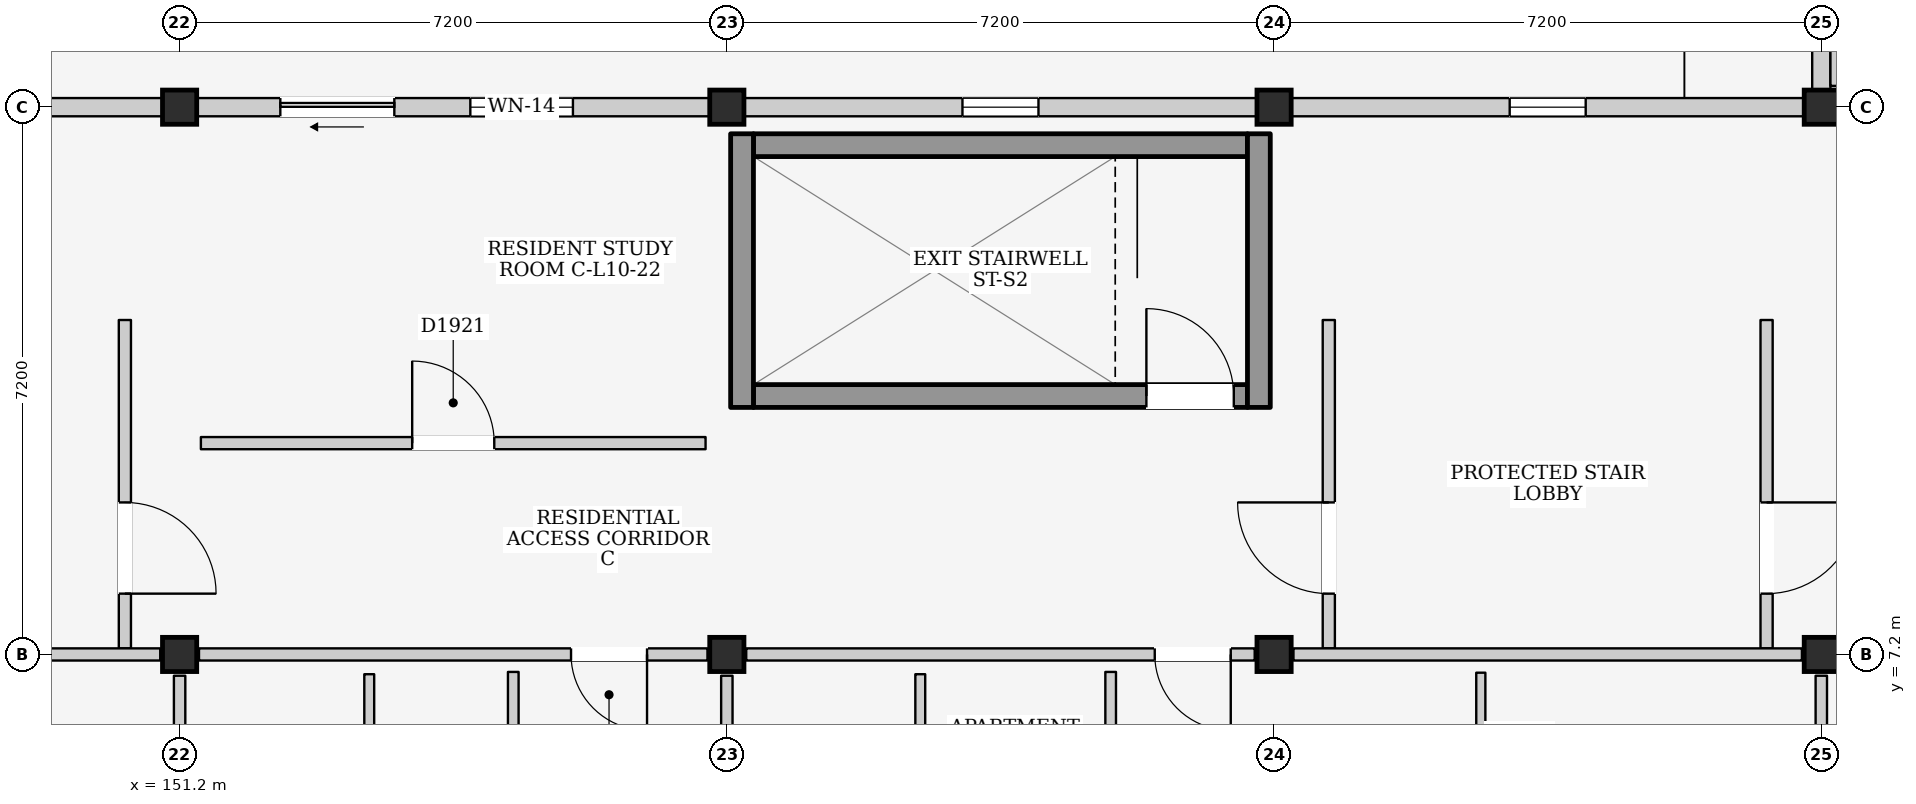
"""IFC4 building model, lengths in metres.
Left out: names, types, materials, properties, quantities, classifications, styles, units other than length and angle.
Written with IfcOpenShell. Run it as: python <this file> out.ifc"""

import sys

from ifc_helpers import new_model, si_unit, direction, frame, frame_2d, origin, origin_2d, place, context, subcontext, project, spatial, rectangle, extrude, element, fill, save


model = new_model("IFC4")
c1 = context("Model", 3, precision=1e-05, world=origin(), true_north=direction((0.0, 1.0)))
c2 = subcontext(c1, "Body", "Model", "MODEL_VIEW")
j1 = project(units=[si_unit("LENGTHUNIT", "METRE"), si_unit("PLANEANGLEUNIT", "RADIAN")], contexts=[c1])
p1 = place(None, origin())
s1 = spatial("IfcSite", under=j1, at=p1, CompositionType="ELEMENT")
p2 = place(p1, origin())
s2 = spatial("IfcBuilding", under=s1, at=p2, CompositionType="ELEMENT")
p3 = place(p2, frame((0.0, 0.0, 34.8)))
s3 = spatial("IfcBuildingStorey", under=s2, at=p3, CompositionType="ELEMENT", Elevation=34.8)
for number, where, z_axis, x_axis in (
    (1, (151.2, 7.2, 0.0), (0.0, 0.0, 1.0), (1.0, 0.0, 0.0)),
    (2, (151.2, 14.4, 0.0), (0.0, 0.0, 1.0), (1.0, 0.0, 0.0)),
    (3, (158.4, 7.2, 0.0), (0.0, 0.0, 1.0), (1.0, 0.0, 0.0)),
    (4, (158.4, 14.4, 0.0), (0.0, 0.0, 1.0), (1.0, 0.0, 0.0)),
    (5, (165.6, 7.2, 0.0), (0.0, 0.0, 1.0), (1.0, 0.0, 0.0)),
    (6, (165.6, 14.4, 0.0), (0.0, 0.0, 1.0), (1.0, 0.0, 0.0)),
    (7, (172.8, 7.2, 0.0), (0.0, 0.0, 1.0), (1.0, 0.0, 0.0)),
    (8, (172.8, 14.4, 0.0), (0.0, 0.0, 1.0), (1.0, 0.0, 0.0)),
):
    element("IfcColumn", number, at=place(p3, frame(where, z_axis=z_axis, x_axis=x_axis)), inside=s3, PredefinedType="COLUMN", context=c2, shape_type="SweptSolid", body=[
        extrude(rectangle(XDim=0.45, YDim=0.45, at=origin_2d()), origin(), (0.0, 0.0, 1.0), 3.2),
    ])
p4 = place(p3, frame((144.225, 14.4, 0.0), z_axis=(0.0, 0.0, 1.0), x_axis=(1.0, 0.0, 0.0)))
e9 = element("IfcWall", 9, at=p4, inside=s3, PredefinedType="ELEMENTEDWALL", context=c2, shape_type="SweptSolid", body=[
    extrude(rectangle(XDim=6.75, YDim=0.24, at=frame_2d((3.375, 0.0))), origin(), (0.0, 0.0, 1.0), 2.345),
])
p5 = place(p4, frame((2.875, 0.0, 1.2)))
e10 = element("IfcOpeningElement", 10, at=p5, cuts=e9, PredefinedType="OPENING", context=c2, shape_type="SweptSolid", body=[
    extrude(rectangle(XDim=1.0, YDim=0.9, at=frame_2d((0.5, 0.45))), frame((0.0, 0.135, 0.0), z_axis=(0.0, -1.0, 0.0), x_axis=(1.0, 0.0, 0.0)), (0.0, 0.0, 1.0), 0.27),
])
p6 = place(p3, frame((151.425, 14.4, 0.0), z_axis=(0.0, 0.0, 1.0), x_axis=(1.0, 0.0, 0.0)))
e11 = element("IfcWall", 11, at=p6, inside=s3, PredefinedType="ELEMENTEDWALL", context=c2, shape_type="SweptSolid", body=[
    extrude(rectangle(XDim=6.75, YDim=0.24, at=frame_2d((3.375, 0.0))), origin(), (0.0, 0.0, 1.0), 2.345),
])
p7 = place(p6, frame((1.1, 0.0, 0.0)))
e12 = element("IfcOpeningElement", 12, at=p7, cuts=e11, PredefinedType="OPENING", context=c2, shape_type="SweptSolid", body=[
    extrude(rectangle(XDim=1.5, YDim=2.12, at=frame_2d((0.75, 1.06))), frame((0.0, 0.135, 0.0), z_axis=(0.0, -1.0, 0.0), x_axis=(1.0, 0.0, 0.0)), (0.0, 0.0, 1.0), 0.27),
])
p8 = place(p6, frame((3.6, 0.0, 0.735)))
e13 = element("IfcOpeningElement", 13, at=p8, cuts=e11, PredefinedType="OPENING", context=c2, shape_type="SweptSolid", body=[
    extrude(rectangle(XDim=1.35, YDim=1.5, at=frame_2d((0.675, 0.75))), frame((0.0, 0.135, 0.0), z_axis=(0.0, -1.0, 0.0), x_axis=(1.0, 0.0, 0.0)), (0.0, 0.0, 1.0), 0.27),
])
p9 = place(p3, frame((158.625, 14.4, 0.0), z_axis=(0.0, 0.0, 1.0), x_axis=(1.0, 0.0, 0.0)))
e14 = element("IfcWall", 14, at=p9, inside=s3, PredefinedType="ELEMENTEDWALL", context=c2, shape_type="SweptSolid", body=[
    extrude(rectangle(XDim=6.75, YDim=0.24, at=frame_2d((3.375, 0.0))), origin(), (0.0, 0.0, 1.0), 2.345),
])
p10 = place(p9, frame((2.875, 0.0, 1.2)))
e15 = element("IfcOpeningElement", 15, at=p10, cuts=e14, PredefinedType="OPENING", context=c2, shape_type="SweptSolid", body=[
    extrude(rectangle(XDim=1.0, YDim=0.9, at=frame_2d((0.5, 0.45))), frame((0.0, 0.135, 0.0), z_axis=(0.0, -1.0, 0.0), x_axis=(1.0, 0.0, 0.0)), (0.0, 0.0, 1.0), 0.27),
])
p11 = place(p3, frame((165.825, 14.4, 0.0), z_axis=(0.0, 0.0, 1.0), x_axis=(1.0, 0.0, 0.0)))
e16 = element("IfcWall", 16, at=p11, inside=s3, PredefinedType="ELEMENTEDWALL", context=c2, shape_type="SweptSolid", body=[
    extrude(rectangle(XDim=6.75, YDim=0.24, at=frame_2d((3.375, 0.0))), origin(), (0.0, 0.0, 1.0), 2.345),
])
p12 = place(p11, frame((2.875, 0.0, 1.2)))
e17 = element("IfcOpeningElement", 17, at=p12, cuts=e16, PredefinedType="OPENING", context=c2, shape_type="SweptSolid", body=[
    extrude(rectangle(XDim=1.0, YDim=0.9, at=frame_2d((0.5, 0.45))), frame((0.0, 0.135, 0.0), z_axis=(0.0, -1.0, 0.0), x_axis=(1.0, 0.0, 0.0)), (0.0, 0.0, 1.0), 0.27),
])
p13 = place(p3, frame((172.8, 14.625, 0.0), z_axis=(0.0, 0.0, 1.0), x_axis=(0.0, 1.0, 0.0)))
e18 = element("IfcWall", 18, at=p13, inside=s3, PredefinedType="ELEMENTEDWALL", context=c2, shape_type="SweptSolid", body=[
    extrude(rectangle(XDim=6.75, YDim=0.24, at=frame_2d((3.375, 0.0))), origin(), (0.0, 0.0, 1.0), 2.445),
])
p14 = place(p13, frame((2.5, 0.0, 0.0)))
e19 = element("IfcOpeningElement", 19, at=p14, cuts=e18, PredefinedType="OPENING", context=c2, shape_type="SweptSolid", body=[
    extrude(rectangle(XDim=1.4, YDim=2.1, at=frame_2d((0.7, 1.05))), frame((0.0, 0.135, 0.0), z_axis=(0.0, -1.0, 0.0), x_axis=(1.0, 0.0, 0.0)), (0.0, 0.0, 1.0), 0.27),
])
p15 = place(p3, frame((150.48, 7.28, 0.0), z_axis=(0.0, 0.0, 1.0), x_axis=(0.0, 1.0, 0.0)))
e20 = element("IfcWall", 20, at=p15, inside=s3, PredefinedType="PARTITIONING", context=c2, shape_type="SweptSolid", body=[
    extrude(rectangle(XDim=4.32, YDim=0.16, at=frame_2d((2.16, 0.0))), origin(), (0.0, 0.0, 1.0), 2.96),
])
p16 = place(p15, frame((0.72, 0.0, 0.0)))
e21 = element("IfcOpeningElement", 21, at=p16, cuts=e20, PredefinedType="OPENING", context=c2, shape_type="SweptSolid", body=[
    extrude(rectangle(XDim=1.2, YDim=2.2, at=frame_2d((0.6, 1.1))), frame((0.0, 0.095, 0.0), z_axis=(0.0, -1.0, 0.0), x_axis=(1.0, 0.0, 0.0)), (0.0, 0.0, 1.0), 0.19),
])
p17 = place(p3, frame((158.75, 10.6, 0.0), z_axis=(0.0, 0.0, 1.0), x_axis=(1.0, 0.0, 0.0)))
e22 = element("IfcWall", 22, at=p17, inside=s3, PredefinedType="SHEAR", context=c2, shape_type="SweptSolid", body=[
    extrude(rectangle(XDim=6.5, YDim=0.3, at=frame_2d((3.25, 0.0))), origin(), (0.0, 0.0, 1.0), 2.96),
])
p18 = place(p17, frame((5.17, 0.0, 0.0)))
e23 = element("IfcOpeningElement", 23, at=p18, cuts=e22, PredefinedType="OPENING", context=c2, shape_type="SweptSolid", body=[
    extrude(rectangle(XDim=1.15, YDim=2.2, at=frame_2d((0.575, 1.1))), frame((0.0, 0.165, 0.0), z_axis=(0.0, -1.0, 0.0), x_axis=(1.0, 0.0, 0.0)), (0.0, 0.0, 1.0), 0.33),
])
p19 = place(p3, frame((158.75, 13.9, 0.0), z_axis=(0.0, 0.0, 1.0), x_axis=(1.0, 0.0, 0.0)))
e24 = element("IfcWall", 24, at=p19, inside=s3, PredefinedType="SHEAR", context=c2, shape_type="SweptSolid", body=[
    extrude(rectangle(XDim=6.5, YDim=0.3, at=frame_2d((3.25, 0.0))), origin(), (0.0, 0.0, 1.0), 2.96),
])
for number, where, z_axis, x_axis in (
    (25, (158.6, 10.45, 0.0), (0.0, 0.0, 1.0), (0.0, 1.0, 0.0)),
    (26, (165.4, 10.45, 0.0), (0.0, 0.0, 1.0), (0.0, 1.0, 0.0)),
):
    element("IfcWall", number, at=place(p3, frame(where, z_axis=z_axis, x_axis=x_axis)), inside=s3, PredefinedType="SHEAR", context=c2, shape_type="SweptSolid", body=[
        extrude(rectangle(XDim=3.6, YDim=0.3, at=frame_2d((1.8, 0.0))), origin(), (0.0, 0.0, 1.0), 2.96),
    ])
p20 = place(p3, frame((166.32, 7.28, 0.0), z_axis=(0.0, 0.0, 1.0), x_axis=(0.0, 1.0, 0.0)))
e27 = element("IfcWall", 27, at=p20, inside=s3, PredefinedType="PARTITIONING", context=c2, shape_type="SweptSolid", body=[
    extrude(rectangle(XDim=4.32, YDim=0.16, at=frame_2d((2.16, 0.0))), origin(), (0.0, 0.0, 1.0), 2.96),
])
p21 = place(p20, frame((0.72, 0.0, 0.0)))
e28 = element("IfcOpeningElement", 28, at=p21, cuts=e27, PredefinedType="OPENING", context=c2, shape_type="SweptSolid", body=[
    extrude(rectangle(XDim=1.2, YDim=2.2, at=frame_2d((0.6, 1.1))), frame((0.0, 0.095, 0.0), z_axis=(0.0, -1.0, 0.0), x_axis=(1.0, 0.0, 0.0)), (0.0, 0.0, 1.0), 0.19),
])
p22 = place(p3, frame((172.08, 7.28, 0.0), z_axis=(0.0, 0.0, 1.0), x_axis=(0.0, 1.0, 0.0)))
e29 = element("IfcWall", 29, at=p22, inside=s3, PredefinedType="PARTITIONING", context=c2, shape_type="SweptSolid", body=[
    extrude(rectangle(XDim=4.32, YDim=0.16, at=frame_2d((2.16, 0.0))), origin(), (0.0, 0.0, 1.0), 2.96),
])
p23 = place(p22, frame((0.72, 0.0, 0.0)))
e30 = element("IfcOpeningElement", 30, at=p23, cuts=e29, PredefinedType="OPENING", context=c2, shape_type="SweptSolid", body=[
    extrude(rectangle(XDim=1.2, YDim=2.2, at=frame_2d((0.6, 1.1))), frame((0.0, 0.095, 0.0), z_axis=(0.0, -1.0, 0.0), x_axis=(1.0, 0.0, 0.0)), (0.0, 0.0, 1.0), 0.19),
])
p24 = place(p3, frame((144.255, 7.2, 0.0), z_axis=(0.0, 0.0, 1.0), x_axis=(1.0, 0.0, 0.0)))
e31 = element("IfcWall", 31, at=p24, inside=s3, PredefinedType="PARTITIONING", context=c2, shape_type="SweptSolid", body=[
    extrude(rectangle(XDim=6.69, YDim=0.16, at=frame_2d((3.345, 0.0))), origin(), (0.0, 0.0, 1.0), 2.345),
])
p25 = place(p3, frame((151.2, 0.28, 0.0), z_axis=(0.0, 0.0, 1.0), x_axis=(0.0, 1.0, 0.0)))
e32 = element("IfcWall", 32, at=p25, inside=s3, PredefinedType="PARTITIONING", context=c2, shape_type="SweptSolid", body=[
    extrude(rectangle(XDim=6.64, YDim=0.15, at=frame_2d((3.32, 0.0))), origin(), (0.0, 0.0, 1.0), 2.445),
])
p26 = place(p3, frame((151.455, 7.2, 0.0), z_axis=(0.0, 0.0, 1.0), x_axis=(1.0, 0.0, 0.0)))
e33 = element("IfcWall", 33, at=p26, inside=s3, PredefinedType="PARTITIONING", context=c2, shape_type="SweptSolid", body=[
    extrude(rectangle(XDim=6.69, YDim=0.16, at=frame_2d((3.345, 0.0))), origin(), (0.0, 0.0, 1.0), 2.345),
])
p27 = place(p26, frame((4.895, 0.0, 0.0)))
e34 = element("IfcOpeningElement", 34, at=p27, cuts=e33, PredefinedType="OPENING", context=c2, shape_type="SweptSolid", body=[
    extrude(rectangle(XDim=1.0, YDim=2.15, at=frame_2d((0.5, 1.075))), frame((0.0, 0.095, 0.0), z_axis=(0.0, -1.0, 0.0), x_axis=(1.0, 0.0, 0.0)), (0.0, 0.0, 1.0), 0.19),
])
p28 = place(p3, frame((158.4, 0.28, 0.0), z_axis=(0.0, 0.0, 1.0), x_axis=(0.0, 1.0, 0.0)))
e35 = element("IfcWall", 35, at=p28, inside=s3, PredefinedType="PARTITIONING", context=c2, shape_type="SweptSolid", body=[
    extrude(rectangle(XDim=6.64, YDim=0.15, at=frame_2d((3.32, 0.0))), origin(), (0.0, 0.0, 1.0), 2.445),
])
p29 = place(p3, frame((153.695, 4.61, 0.0), z_axis=(0.0, 0.0, 1.0), x_axis=(0.0, 1.0, 0.0)))
e36 = element("IfcWall", 36, at=p29, inside=s3, PredefinedType="PARTITIONING", context=c2, shape_type="SweptSolid", body=[
    extrude(rectangle(XDim=2.33, YDim=0.13, at=frame_2d((1.165, 0.0))), origin(), (0.0, 0.0, 1.0), 2.96),
])
p30 = place(p3, frame((155.59, 4.62, 0.0), z_axis=(0.0, 0.0, 1.0), x_axis=(0.0, 1.0, 0.0)))
e37 = element("IfcWall", 37, at=p30, inside=s3, PredefinedType="PARTITIONING", context=c2, shape_type="SweptSolid", body=[
    extrude(rectangle(XDim=2.35, YDim=0.14, at=frame_2d((1.175, 0.0))), origin(), (0.0, 0.0, 1.0), 2.96),
])
p31 = place(p3, frame((158.655, 7.2, 0.0), z_axis=(0.0, 0.0, 1.0), x_axis=(1.0, 0.0, 0.0)))
e38 = element("IfcWall", 38, at=p31, inside=s3, PredefinedType="PARTITIONING", context=c2, shape_type="SweptSolid", body=[
    extrude(rectangle(XDim=6.69, YDim=0.16, at=frame_2d((3.345, 0.0))), origin(), (0.0, 0.0, 1.0), 2.345),
])
p32 = place(p31, frame((5.375, 0.0, 0.0)))
e39 = element("IfcOpeningElement", 39, at=p32, cuts=e38, PredefinedType="OPENING", context=c2, shape_type="SweptSolid", body=[
    extrude(rectangle(XDim=1.0, YDim=2.15, at=frame_2d((0.5, 1.075))), frame((0.0, 0.095, 0.0), z_axis=(0.0, -1.0, 0.0), x_axis=(1.0, 0.0, 0.0)), (0.0, 0.0, 1.0), 0.19),
])
p33 = place(p3, frame((165.855, 7.2, 0.0), z_axis=(0.0, 0.0, 1.0), x_axis=(1.0, 0.0, 0.0)))
e40 = element("IfcWall", 40, at=p33, inside=s3, PredefinedType="PARTITIONING", context=c2, shape_type="SweptSolid", body=[
    extrude(rectangle(XDim=6.69, YDim=0.16, at=frame_2d((3.345, 0.0))), origin(), (0.0, 0.0, 1.0), 2.345),
])
p34 = place(p3, frame((172.8, 0.28, 0.0), z_axis=(0.0, 0.0, 1.0), x_axis=(0.0, 1.0, 0.0)))
e41 = element("IfcWall", 41, at=p34, inside=s3, PredefinedType="PARTITIONING", context=c2, shape_type="SweptSolid", body=[
    extrude(rectangle(XDim=6.64, YDim=0.15, at=frame_2d((3.32, 0.0))), origin(), (0.0, 0.0, 1.0), 2.445),
])
p35 = place(p3, frame((160.945, 3.9, 0.0), z_axis=(0.0, 0.0, 1.0), x_axis=(0.0, 1.0, 0.0)))
e42 = element("IfcWall", 42, at=p35, inside=s3, PredefinedType="PARTITIONING", context=c2, shape_type="SweptSolid", body=[
    extrude(rectangle(XDim=3.04, YDim=0.13, at=frame_2d((1.52, 0.0))), origin(), (0.0, 0.0, 1.0), 2.96),
])
p36 = place(p3, frame((163.45, 3.91, 0.0), z_axis=(0.0, 0.0, 1.0), x_axis=(0.0, 1.0, 0.0)))
e43 = element("IfcWall", 43, at=p36, inside=s3, PredefinedType="PARTITIONING", context=c2, shape_type="SweptSolid", body=[
    extrude(rectangle(XDim=3.06, YDim=0.14, at=frame_2d((1.53, 0.0))), origin(), (0.0, 0.0, 1.0), 2.96),
])
p37 = place(p3, frame((168.32, 3.92, 0.0), z_axis=(0.0, 0.0, 1.0), x_axis=(0.0, 1.0, 0.0)))
e44 = element("IfcWall", 44, at=p37, inside=s3, PredefinedType="PARTITIONING", context=c2, shape_type="SweptSolid", body=[
    extrude(rectangle(XDim=3.04, YDim=0.12, at=frame_2d((1.52, 0.0))), origin(), (0.0, 0.0, 1.0), 2.96),
])
p38 = place(p37, frame((1.04, 0.0, 0.0)))
e45 = element("IfcOpeningElement", 45, at=p38, cuts=e44, PredefinedType="OPENING", context=c2, shape_type="SweptSolid", body=[
    extrude(rectangle(XDim=0.96, YDim=2.15, at=frame_2d((0.48, 1.075))), frame((0.0, 0.075, 0.0), z_axis=(0.0, -1.0, 0.0), x_axis=(1.0, 0.0, 0.0)), (0.0, 0.0, 1.0), 0.15),
])
p39 = place(p3, frame((151.48, 9.98, 0.0), z_axis=(0.0, 0.0, 1.0), x_axis=(1.0, 0.0, 0.0)))
e46 = element("IfcWall", 46, at=p39, inside=s3, PredefinedType="PARTITIONING", context=c2, shape_type="SweptSolid", body=[
    extrude(rectangle(XDim=6.64, YDim=0.16, at=frame_2d((3.32, 0.0))), origin(), (0.0, 0.0, 1.0), 2.96),
])
p40 = place(p39, frame((2.78, 0.0, 0.0)))
e47 = element("IfcOpeningElement", 47, at=p40, cuts=e46, PredefinedType="OPENING", context=c2, shape_type="SweptSolid", body=[
    extrude(rectangle(XDim=1.08, YDim=2.22, at=frame_2d((0.54, 1.11))), frame((0.0, 0.095, 0.0), z_axis=(0.0, -1.0, 0.0), x_axis=(1.0, 0.0, 0.0)), (0.0, 0.0, 1.0), 0.19),
])
p41 = place(p3, frame((173.0, 14.68, 0.0), z_axis=(0.0, 0.0, 1.0), x_axis=(0.0, 1.0, 0.0)))
e48 = element("IfcWall", 48, at=p41, inside=s3, PredefinedType="PARTITIONING", context=c2, shape_type="SweptSolid", body=[
    extrude(rectangle(XDim=6.64, YDim=0.16, at=frame_2d((3.32, 0.0))), origin(), (0.0, 0.0, 1.0), 2.96),
])
p42 = place(p41, frame((2.81, 0.0, 0.0)))
e49 = element("IfcOpeningElement", 49, at=p42, cuts=e48, PredefinedType="OPENING", context=c2, shape_type="SweptSolid", body=[
    extrude(rectangle(XDim=1.02, YDim=2.18, at=frame_2d((0.51, 1.09))), frame((0.0, 0.095, 0.0), z_axis=(0.0, -1.0, 0.0), x_axis=(1.0, 0.0, 0.0)), (0.0, 0.0, 1.0), 0.19),
])
p43 = place(p7, frame((1.5, 0.0, 0.0), z_axis=(0.0, 0.0, 1.0), x_axis=(-1.0, 0.0, 0.0)))
e50 = element("IfcDoor", 50, at=p43, inside=s3, OperationType="SLIDING_TO_LEFT", PredefinedType="DOOR", context=c2, shape_type="SweptSolid", body=[
    extrude(rectangle(XDim=1.5, YDim=2.12, at=frame_2d((0.75, 1.06))), frame((0.0, 0.025, 0.0), z_axis=(0.0, -1.0, 0.0), x_axis=(1.0, 0.0, 0.0)), (0.0, 0.0, 1.0), 0.05),
])
fill(e12, e50)
p44 = place(p8, origin())
e51 = element("IfcWindow", 51, at=p44, inside=s3, PartitioningType="SINGLE_PANEL", PredefinedType="WINDOW", context=c2, shape_type="SweptSolid", body=[
    extrude(rectangle(XDim=1.35, YDim=1.5, at=frame_2d((0.675, 0.75))), frame((0.0, 0.03, 0.0), z_axis=(0.0, -1.0, 0.0), x_axis=(1.0, 0.0, 0.0)), (0.0, 0.0, 1.0), 0.06),
])
fill(e13, e51)
p45 = place(p10, origin())
e52 = element("IfcWindow", 52, at=p45, inside=s3, PartitioningType="SINGLE_PANEL", PredefinedType="WINDOW", context=c2, shape_type="SweptSolid", body=[
    extrude(rectangle(XDim=1.0, YDim=0.9, at=frame_2d((0.5, 0.45))), frame((0.0, 0.03, 0.0), z_axis=(0.0, -1.0, 0.0), x_axis=(1.0, 0.0, 0.0)), (0.0, 0.0, 1.0), 0.06),
])
fill(e15, e52)
p46 = place(p12, origin())
e53 = element("IfcWindow", 53, at=p46, inside=s3, PartitioningType="SINGLE_PANEL", PredefinedType="WINDOW", context=c2, shape_type="SweptSolid", body=[
    extrude(rectangle(XDim=1.0, YDim=0.9, at=frame_2d((0.5, 0.45))), frame((0.0, 0.03, 0.0), z_axis=(0.0, -1.0, 0.0), x_axis=(1.0, 0.0, 0.0)), (0.0, 0.0, 1.0), 0.06),
])
fill(e17, e53)
p47 = place(p16, frame((1.2, 0.0, 0.0), z_axis=(0.0, 0.0, 1.0), x_axis=(-1.0, 0.0, 0.0)))
e54 = element("IfcDoor", 54, at=p47, inside=s3, OperationType="SINGLE_SWING_RIGHT", PredefinedType="DOOR", context=c2, shape_type="SweptSolid", body=[
    extrude(rectangle(XDim=1.2, YDim=2.2, at=frame_2d((0.6, 1.1))), frame((0.0, 0.025, 0.0), z_axis=(0.0, -1.0, 0.0), x_axis=(1.0, 0.0, 0.0)), (0.0, 0.0, 1.0), 0.05),
])
fill(e21, e54)
p48 = place(p18, origin())
e55 = element("IfcDoor", 55, at=p48, inside=s3, OperationType="SINGLE_SWING_LEFT", PredefinedType="DOOR", context=c2, shape_type="SweptSolid", body=[
    extrude(rectangle(XDim=1.15, YDim=2.2, at=frame_2d((0.575, 1.1))), frame((0.0, 0.025, 0.0), z_axis=(0.0, -1.0, 0.0), x_axis=(1.0, 0.0, 0.0)), (0.0, 0.0, 1.0), 0.05),
])
fill(e23, e55)
p49 = place(p21, origin())
e56 = element("IfcDoor", 56, at=p49, inside=s3, OperationType="SINGLE_SWING_RIGHT", PredefinedType="DOOR", context=c2, shape_type="SweptSolid", body=[
    extrude(rectangle(XDim=1.2, YDim=2.2, at=frame_2d((0.6, 1.1))), frame((0.0, 0.025, 0.0), z_axis=(0.0, -1.0, 0.0), x_axis=(1.0, 0.0, 0.0)), (0.0, 0.0, 1.0), 0.05),
])
fill(e28, e56)
p50 = place(p23, frame((1.2, 0.0, 0.0), z_axis=(0.0, 0.0, 1.0), x_axis=(-1.0, 0.0, 0.0)))
e57 = element("IfcDoor", 57, at=p50, inside=s3, OperationType="SINGLE_SWING_LEFT", PredefinedType="DOOR", context=c2, shape_type="SweptSolid", body=[
    extrude(rectangle(XDim=1.2, YDim=2.2, at=frame_2d((0.6, 1.1))), frame((0.0, 0.025, 0.0), z_axis=(0.0, -1.0, 0.0), x_axis=(1.0, 0.0, 0.0)), (0.0, 0.0, 1.0), 0.05),
])
fill(e30, e57)
p51 = place(p27, frame((1.0, 0.0, 0.0), z_axis=(0.0, 0.0, 1.0), x_axis=(-1.0, 0.0, 0.0)))
e58 = element("IfcDoor", 58, at=p51, inside=s3, OperationType="SINGLE_SWING_LEFT", PredefinedType="DOOR", context=c2, shape_type="SweptSolid", body=[
    extrude(rectangle(XDim=1.0, YDim=2.15, at=frame_2d((0.5, 1.075))), frame((0.0, 0.025, 0.0), z_axis=(0.0, -1.0, 0.0), x_axis=(1.0, 0.0, 0.0)), (0.0, 0.0, 1.0), 0.05),
])
fill(e34, e58)
p52 = place(p32, frame((1.0, 0.0, 0.0), z_axis=(0.0, 0.0, 1.0), x_axis=(-1.0, 0.0, 0.0)))
e59 = element("IfcDoor", 59, at=p52, inside=s3, OperationType="SINGLE_SWING_LEFT", PredefinedType="DOOR", context=c2, shape_type="SweptSolid", body=[
    extrude(rectangle(XDim=1.0, YDim=2.15, at=frame_2d((0.5, 1.075))), frame((0.0, 0.025, 0.0), z_axis=(0.0, -1.0, 0.0), x_axis=(1.0, 0.0, 0.0)), (0.0, 0.0, 1.0), 0.05),
])
fill(e39, e59)
p53 = place(p40, origin())
e60 = element("IfcDoor", 60, at=p53, inside=s3, OperationType="SINGLE_SWING_LEFT", PredefinedType="DOOR", context=c2, shape_type="SweptSolid", body=[
    extrude(rectangle(XDim=1.08, YDim=2.22, at=frame_2d((0.54, 1.11))), frame((0.0, 0.025, 0.0), z_axis=(0.0, -1.0, 0.0), x_axis=(1.0, 0.0, 0.0)), (0.0, 0.0, 1.0), 0.05),
])
fill(e47, e60)
save(model, sys.argv[1])
